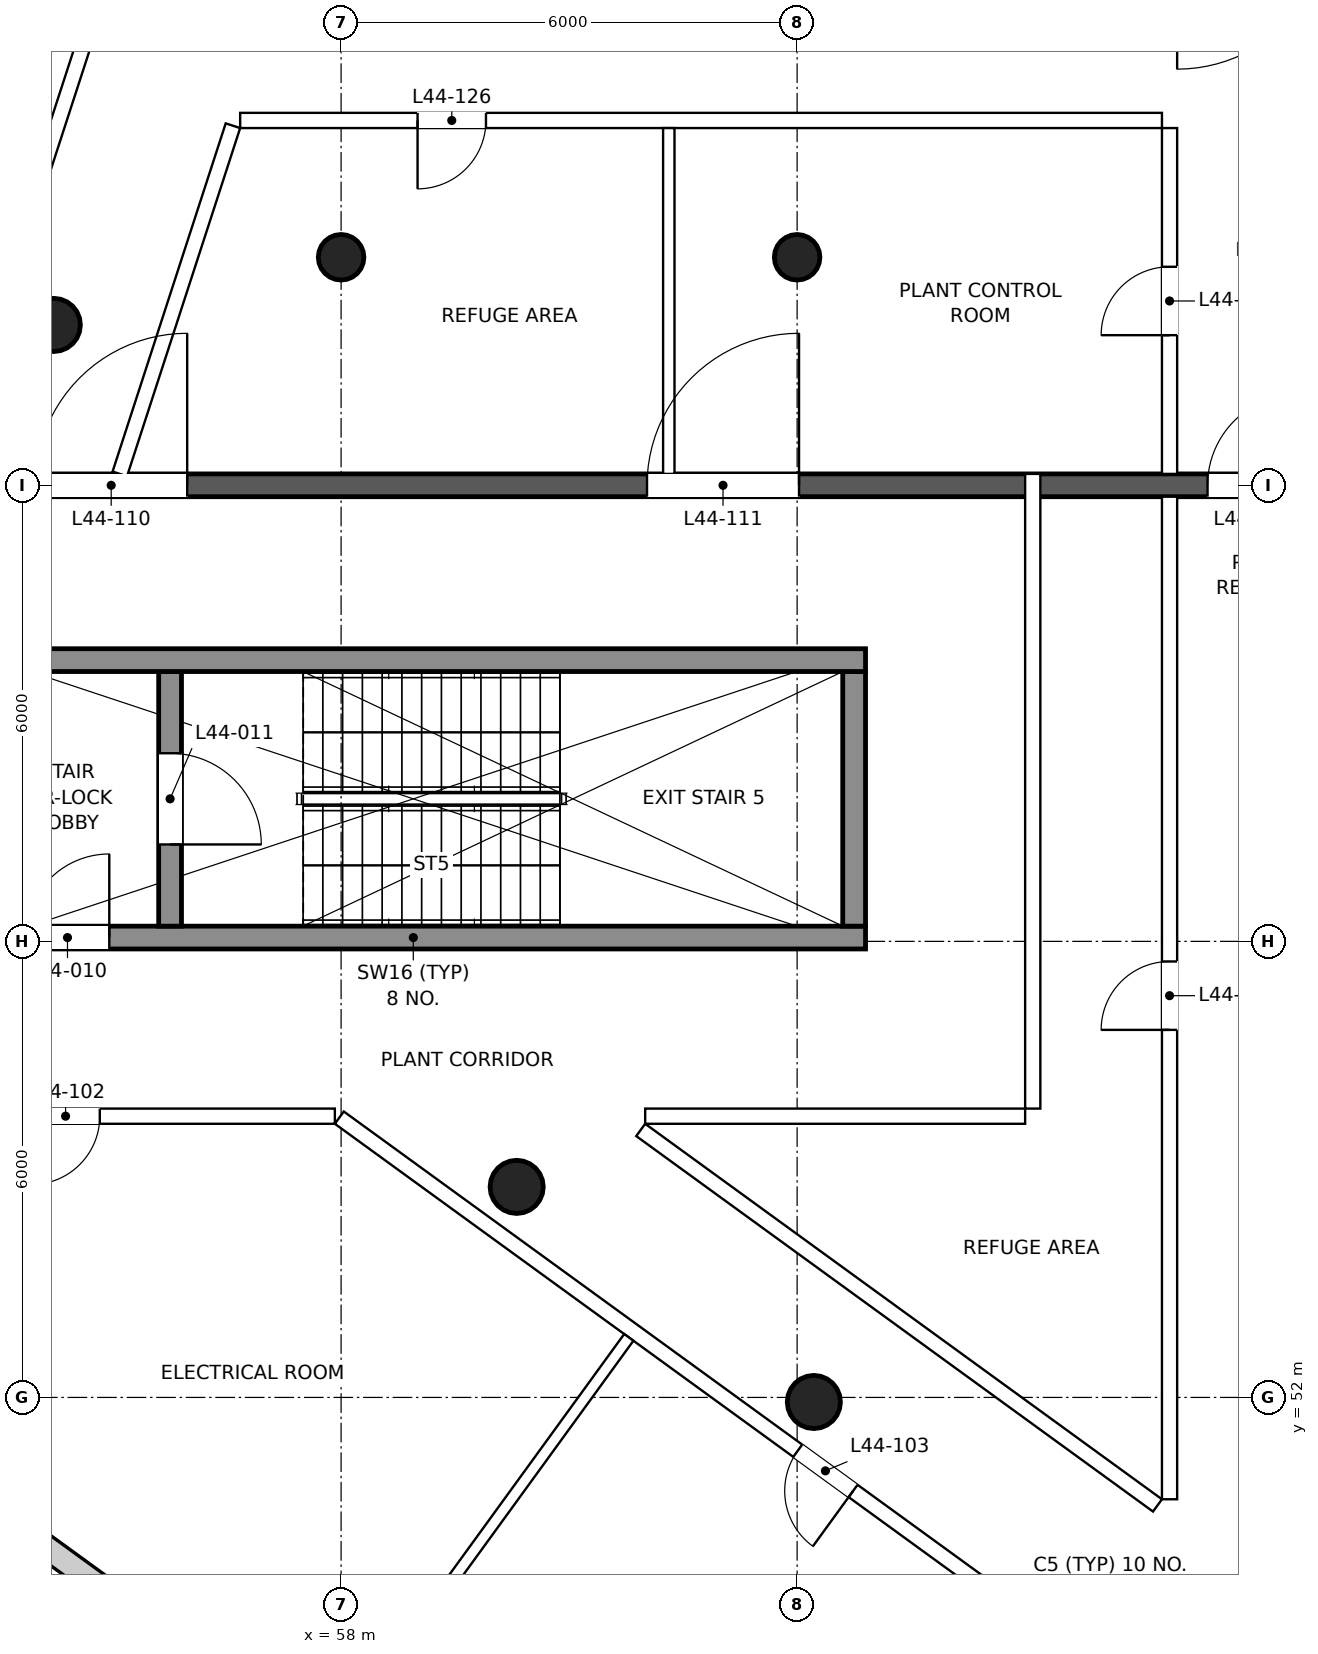
"""IFC4 building model, lengths in metres.
Left out: names, types, materials, properties, quantities, classifications, styles, units other than length and angle.
Written with IfcOpenShell. Run it as: python <this file> out.ifc"""

import sys

from ifc_helpers import new_model, si_unit, direction, frame, frame_2d, origin, origin_2d, place, context, subcontext, project, spatial, rectangle, circle, extrude, element, fill, save


model = new_model("IFC4")
c1 = context("Model", 3, precision=1e-05, world=origin(), true_north=direction((0.0, 1.0)))
c2 = subcontext(c1, "Body", "Model", "MODEL_VIEW")
j1 = project(units=[si_unit("LENGTHUNIT", "METRE"), si_unit("PLANEANGLEUNIT", "RADIAN")], contexts=[c1])
p1 = place(None, origin())
s1 = spatial("IfcSite", under=j1, at=p1, CompositionType="ELEMENT")
p2 = place(p1, origin())
s2 = spatial("IfcBuilding", under=s1, at=p2, CompositionType="ELEMENT")
p3 = place(p2, frame((0.0, 0.0, 191.5)))
s3 = spatial("IfcBuildingStorey", under=s2, at=p3, CompositionType="ELEMENT", Elevation=191.5)
for number, where, z_axis, x_axis in (
    (1, (60.31, 54.77, 0.0), (0.0, 0.0, 1.0), (1.0, 0.0, 0.0)),
    (2, (64.22, 51.94, 0.0), (0.0, 0.0, 1.0), (1.0, 0.0, 0.0)),
    (3, (54.22, 66.11, 0.0), (0.0, 0.0, 1.0), (1.0, 0.0, 0.0)),
):
    element("IfcColumn", number, at=place(p3, frame(where, z_axis=z_axis, x_axis=x_axis)), inside=s3, PredefinedType="COLUMN", context=c2, shape_type="SweptSolid", body=[
        extrude(circle(Radius=0.35, at=origin_2d()), origin(), (0.0, 0.0, 1.0), 5.0),
    ])
for number, where, z_axis, x_axis in (
    (4, (58.0, 67.0, 0.0), (0.0, 0.0, 1.0), (1.0, 0.0, 0.0)),
    (5, (64.0, 67.0, 0.0), (0.0, 0.0, 1.0), (1.0, 0.0, 0.0)),
):
    element("IfcColumn", number, at=place(p3, frame(where, z_axis=z_axis, x_axis=x_axis)), inside=s3, PredefinedType="COLUMN", context=c2, shape_type="SweptSolid", body=[
        extrude(circle(Radius=0.3, at=origin_2d()), origin(), (0.0, 0.0, 1.0), 5.0),
    ])
p4 = place(p3, frame((47.612, 54.757, 0.0), z_axis=(0.0, 0.0, 1.0), x_axis=(0.809015997552, -0.5877866243, 0.0)))
e6 = element("IfcWall", 6, at=p4, inside=s3, PredefinedType="SOLIDWALL", context=c2, shape_type="SweptSolid", body=[
    extrude(rectangle(XDim=22.246, YDim=0.32, at=frame_2d((11.123, 0.0))), origin(), (0.0, 0.0, 1.0), 4.7),
])
p5 = place(p3, frame((53.0, 58.05, 0.0), z_axis=(0.0, 0.0, 1.0), x_axis=(1.0, 0.0, 0.0)))
e7 = element("IfcWall", 7, at=p5, inside=s3, PredefinedType="SHEAR", context=c2, shape_type="SweptSolid", body=[
    extrude(rectangle(XDim=11.9, YDim=0.3, at=frame_2d((5.95, 0.0))), origin(), (0.0, 0.0, 1.0), 5.0),
])
p6 = place(p5, frame((0.85, 0.0, 0.0)))
e8 = element("IfcOpeningElement", 8, at=p6, cuts=e7, PredefinedType="OPENING", context=c2, shape_type="SweptSolid", body=[
    extrude(rectangle(XDim=1.1, YDim=2.1, at=frame_2d((0.55, 1.05))), frame((0.0, 0.16, 0.0), z_axis=(0.0, -1.0, 0.0), x_axis=(1.0, 0.0, 0.0)), (0.0, 0.0, 1.0), 0.32),
])
p7 = place(p3, frame((55.75, 58.2, 0.0), z_axis=(0.0, 0.0, 1.0), x_axis=(0.0, 1.0, 0.0)))
e9 = element("IfcWall", 9, at=p7, inside=s3, PredefinedType="SHEAR", context=c2, shape_type="SweptSolid", body=[
    extrude(rectangle(XDim=3.35, YDim=0.3, at=frame_2d((1.675, 0.0))), origin(), (0.0, 0.0, 1.0), 5.0),
])
p8 = place(p7, frame((1.075, 0.0, 0.0)))
e10 = element("IfcOpeningElement", 10, at=p8, cuts=e9, PredefinedType="OPENING", context=c2, shape_type="SweptSolid", body=[
    extrude(rectangle(XDim=1.2, YDim=2.1, at=frame_2d((0.6, 1.05))), frame((0.0, 0.16, 0.0), z_axis=(0.0, -1.0, 0.0), x_axis=(1.0, 0.0, 0.0)), (0.0, 0.0, 1.0), 0.32),
])
p9 = place(p3, frame((64.75, 58.2, 0.0), z_axis=(0.0, 0.0, 1.0), x_axis=(0.0, 1.0, 0.0)))
e11 = element("IfcWall", 11, at=p9, inside=s3, PredefinedType="SHEAR", context=c2, shape_type="SweptSolid", body=[
    extrude(rectangle(XDim=3.35, YDim=0.3, at=frame_2d((1.675, 0.0))), origin(), (0.0, 0.0, 1.0), 5.0),
])
p10 = place(p3, frame((53.0, 61.7, 0.0), z_axis=(0.0, 0.0, 1.0), x_axis=(1.0, 0.0, 0.0)))
e12 = element("IfcWall", 12, at=p10, inside=s3, PredefinedType="SHEAR", context=c2, shape_type="SweptSolid", body=[
    extrude(rectangle(XDim=11.9, YDim=0.3, at=frame_2d((5.95, 0.0))), origin(), (0.0, 0.0, 1.0), 5.0),
])
p11 = place(p3, frame((45.703, 64.0, 0.0), z_axis=(0.0, 0.0, 1.0), x_axis=(1.0, 0.0, 0.0)))
e13 = element("IfcWall", 13, at=p11, inside=s3, PredefinedType="PARTITIONING", context=c2, shape_type="SweptSolid", body=[
    extrude(rectangle(XDim=48.595, YDim=0.3, at=frame_2d((24.297, 0.0))), origin(), (0.0, 0.0, 1.0), 3.7),
])
p12 = place(p11, frame((8.272, 0.0, 0.0)))
e14 = element("IfcOpeningElement", 14, at=p12, cuts=e13, PredefinedType="OPENING", context=c2, shape_type="SweptSolid", body=[
    extrude(rectangle(XDim=2.0, YDim=2.1, at=frame_2d((1.0, 1.05))), frame((0.0, 0.16, 0.0), z_axis=(0.0, -1.0, 0.0), x_axis=(1.0, 0.0, 0.0)), (0.0, 0.0, 1.0), 0.32),
])
p13 = place(p11, frame((16.322, 0.0, 0.0)))
e15 = element("IfcOpeningElement", 15, at=p13, cuts=e13, PredefinedType="OPENING", context=c2, shape_type="SweptSolid", body=[
    extrude(rectangle(XDim=2.0, YDim=2.1, at=frame_2d((1.0, 1.05))), frame((0.0, 0.16, 0.0), z_axis=(0.0, -1.0, 0.0), x_axis=(1.0, 0.0, 0.0)), (0.0, 0.0, 1.0), 0.32),
])
p14 = place(p11, frame((23.697, 0.0, 0.0)))
e16 = element("IfcOpeningElement", 16, at=p14, cuts=e13, PredefinedType="OPENING", context=c2, shape_type="SweptSolid", body=[
    extrude(rectangle(XDim=1.2, YDim=2.1, at=frame_2d((0.6, 1.05))), frame((0.0, 0.16, 0.0), z_axis=(0.0, -1.0, 0.0), x_axis=(1.0, 0.0, 0.0)), (0.0, 0.0, 1.0), 0.32),
])
p15 = place(p11, frame((30.272, 0.0, 0.0)))
e17 = element("IfcOpeningElement", 17, at=p15, cuts=e13, PredefinedType="OPENING", context=c2, shape_type="SweptSolid", body=[
    extrude(rectangle(XDim=2.0, YDim=2.1, at=frame_2d((1.0, 1.05))), frame((0.0, 0.16, 0.0), z_axis=(0.0, -1.0, 0.0), x_axis=(1.0, 0.0, 0.0)), (0.0, 0.0, 1.0), 0.32),
])
p16 = place(p11, frame((38.322, 0.0, 0.0)))
e18 = element("IfcOpeningElement", 18, at=p16, cuts=e13, PredefinedType="OPENING", context=c2, shape_type="SweptSolid", body=[
    extrude(rectangle(XDim=2.0, YDim=2.1, at=frame_2d((1.0, 1.05))), frame((0.0, 0.16, 0.0), z_axis=(0.0, -1.0, 0.0), x_axis=(1.0, 0.0, 0.0)), (0.0, 0.0, 1.0), 0.32),
])
p17 = place(p3, frame((52.678, 63.85, 0.0), z_axis=(0.0, 0.0, 1.0), x_axis=(0.309023094896, 0.951054534094, 0.0)))
e19 = element("IfcWall", 19, at=p17, inside=s3, PredefinedType="PARTITIONING", context=c2, shape_type="SweptSolid", body=[
    extrude(rectangle(XDim=13.324, YDim=0.2, at=frame_2d((6.662, 0.0))), origin(), (0.0, 0.0, 1.0), 3.7),
])
p18 = place(p17, frame((1.516, 0.0, 0.0)))
e20 = element("IfcOpeningElement", 20, at=p18, cuts=e19, PredefinedType="OPENING", context=c2, shape_type="SweptSolid", body=[
    extrude(rectangle(XDim=0.9, YDim=2.1, at=frame_2d((0.45, 1.05))), frame((0.0, 0.11, 0.0), z_axis=(0.0, -1.0, 0.0), x_axis=(1.0, 0.0, 0.0)), (0.0, 0.0, 1.0), 0.22),
])
p19 = place(p17, frame((6.602, 0.0, 0.0)))
e21 = element("IfcOpeningElement", 21, at=p19, cuts=e19, PredefinedType="OPENING", context=c2, shape_type="SweptSolid", body=[
    extrude(rectangle(XDim=0.9, YDim=2.1, at=frame_2d((0.45, 1.05))), frame((0.0, 0.11, 0.0), z_axis=(0.0, -1.0, 0.0), x_axis=(1.0, 0.0, 0.0)), (0.0, 0.0, 1.0), 0.22),
])
p20 = place(p17, frame((11.351, 0.0, 0.0)))
e22 = element("IfcOpeningElement", 22, at=p20, cuts=e19, PredefinedType="OPENING", context=c2, shape_type="SweptSolid", body=[
    extrude(rectangle(XDim=0.9, YDim=2.1, at=frame_2d((0.45, 1.05))), frame((0.0, 0.11, 0.0), z_axis=(0.0, -1.0, 0.0), x_axis=(1.0, 0.0, 0.0)), (0.0, 0.0, 1.0), 0.22),
])
p21 = place(p3, frame((67.805, 48.54, 0.0), z_axis=(0.0, 0.0, 1.0), x_axis=(-0.809021032416, 0.587779694366, 0.0)))
e23 = element("IfcWall", 23, at=p21, inside=s3, PredefinedType="PARTITIONING", context=c2, shape_type="SweptSolid", body=[
    extrude(rectangle(XDim=12.148, YDim=0.2, at=frame_2d((6.074, 0.0))), origin(), (0.0, 0.0, 1.0), 3.7),
])
p22 = place(p21, frame((3.793, 0.0, 0.0)))
e24 = element("IfcOpeningElement", 24, at=p22, cuts=e23, PredefinedType="OPENING", context=c2, shape_type="SweptSolid", body=[
    extrude(rectangle(XDim=0.9, YDim=2.1, at=frame_2d((0.45, 1.05))), frame((0.0, 0.11, 0.0), z_axis=(0.0, -1.0, 0.0), x_axis=(1.0, 0.0, 0.0)), (0.0, 0.0, 1.0), 0.22),
])
p23 = place(p21, frame((0.318, 0.0, 0.0)))
e25 = element("IfcOpeningElement", 25, at=p23, cuts=e23, PredefinedType="OPENING", context=c2, shape_type="SweptSolid", body=[
    extrude(rectangle(XDim=0.8, YDim=2.1, at=frame_2d((0.4, 1.05))), frame((0.0, 0.11, 0.0), z_axis=(0.0, -1.0, 0.0), x_axis=(1.0, 0.0, 0.0)), (0.0, 0.0, 1.0), 0.22),
])
p24 = place(p3, frame((57.918, 55.7, 0.0), z_axis=(0.0, 0.0, 1.0), x_axis=(-1.0, 0.0, 0.0)))
e26 = element("IfcWall", 26, at=p24, inside=s3, PredefinedType="PARTITIONING", context=c2, shape_type="SweptSolid", body=[
    extrude(rectangle(XDim=7.018, YDim=0.2, at=frame_2d((3.509, 0.0))), origin(), (0.0, 0.0, 1.0), 4.25),
])
p25 = place(p24, frame((3.093, 0.0, 0.0)))
e27 = element("IfcOpeningElement", 27, at=p25, cuts=e26, PredefinedType="OPENING", context=c2, shape_type="SweptSolid", body=[
    extrude(rectangle(XDim=0.9, YDim=2.1, at=frame_2d((0.45, 1.05))), frame((0.0, 0.11, 0.0), z_axis=(0.0, -1.0, 0.0), x_axis=(1.0, 0.0, 0.0)), (0.0, 0.0, 1.0), 0.22),
])
p26 = place(p3, frame((68.9, 50.66, 0.0), z_axis=(0.0, 0.0, 1.0), x_axis=(0.0, 1.0, 0.0)))
e28 = element("IfcWall", 28, at=p26, inside=s3, PredefinedType="PARTITIONING", context=c2, shape_type="SweptSolid", body=[
    extrude(rectangle(XDim=13.19, YDim=0.2, at=frame_2d((6.595, 0.0))), origin(), (0.0, 0.0, 1.0), 3.7),
])
p27 = place(p26, frame((6.175, 0.0, 0.0)))
e29 = element("IfcOpeningElement", 29, at=p27, cuts=e28, PredefinedType="OPENING", context=c2, shape_type="SweptSolid", body=[
    extrude(rectangle(XDim=0.9, YDim=2.1, at=frame_2d((0.45, 1.05))), frame((0.0, 0.11, 0.0), z_axis=(0.0, -1.0, 0.0), x_axis=(1.0, 0.0, 0.0)), (0.0, 0.0, 1.0), 0.22),
])
p28 = place(p3, frame((68.9, 64.15, 0.0), z_axis=(0.0, 0.0, 1.0), x_axis=(0.0, 1.0, 0.0)))
e30 = element("IfcWall", 30, at=p28, inside=s3, PredefinedType="PARTITIONING", context=c2, shape_type="SweptSolid", body=[
    extrude(rectangle(XDim=4.55, YDim=0.2, at=frame_2d((2.275, 0.0))), origin(), (0.0, 0.0, 1.0), 4.7),
])
p29 = place(p28, frame((1.825, 0.0, 0.0)))
e31 = element("IfcOpeningElement", 31, at=p29, cuts=e30, PredefinedType="OPENING", context=c2, shape_type="SweptSolid", body=[
    extrude(rectangle(XDim=0.9, YDim=2.1, at=frame_2d((0.45, 1.05))), frame((0.0, 0.11, 0.0), z_axis=(0.0, -1.0, 0.0), x_axis=(1.0, 0.0, 0.0)), (0.0, 0.0, 1.0), 0.22),
])
p30 = place(p3, frame((68.8, 68.8, 0.0), z_axis=(0.0, 0.0, 1.0), x_axis=(-1.0, 0.0, 0.0)))
e32 = element("IfcWall", 32, at=p30, inside=s3, PredefinedType="PARTITIONING", context=c2, shape_type="SweptSolid", body=[
    extrude(rectangle(XDim=12.128, YDim=0.2, at=frame_2d((6.064, 0.0))), origin(), (0.0, 0.0, 1.0), 4.7),
])
p31 = place(p30, frame((8.894, 0.0, 0.0)))
e33 = element("IfcOpeningElement", 33, at=p31, cuts=e32, PredefinedType="OPENING", context=c2, shape_type="SweptSolid", body=[
    extrude(rectangle(XDim=0.9, YDim=2.1, at=frame_2d((0.45, 1.05))), frame((0.0, 0.11, 0.0), z_axis=(0.0, -1.0, 0.0), x_axis=(1.0, 0.0, 0.0)), (0.0, 0.0, 1.0), 0.22),
])
p32 = place(p3, frame((56.577, 68.731, 0.0), z_axis=(0.0, 0.0, 1.0), x_axis=(-0.309026476021, -0.951053435469, 0.0)))
e34 = element("IfcWall", 34, at=p32, inside=s3, PredefinedType="PARTITIONING", context=c2, shape_type="SweptSolid", body=[
    extrude(rectangle(XDim=4.817, YDim=0.2, at=frame_2d((2.408, 0.0))), origin(), (0.0, 0.0, 1.0), 3.7),
])
p33 = place(p3, frame((67.1, 64.15, 0.0), z_axis=(0.0, 0.0, 1.0), x_axis=(0.0, -1.0, 0.0)))
e35 = element("IfcWall", 35, at=p33, inside=s3, PredefinedType="PARTITIONING", context=c2, shape_type="SweptSolid", body=[
    extrude(rectangle(XDim=8.35, YDim=0.2, at=frame_2d((4.175, 0.0))), origin(), (0.0, 0.0, 1.0), 3.7),
])
p34 = place(p3, frame((67.0, 55.7, 0.0), z_axis=(0.0, 0.0, 1.0), x_axis=(-1.0, 0.0, 0.0)))
e36 = element("IfcWall", 36, at=p34, inside=s3, PredefinedType="PARTITIONING", context=c2, shape_type="SweptSolid", body=[
    extrude(rectangle(XDim=4.999, YDim=0.2, at=frame_2d((2.5, 0.0))), origin(), (0.0, 0.0, 1.0), 3.7),
])
p35 = place(p3, frame((61.942, 55.519, 0.0), z_axis=(0.0, 0.0, 1.0), x_axis=(0.809023664715, -0.587776071248, 0.0)))
e37 = element("IfcWall", 37, at=p35, inside=s3, PredefinedType="PARTITIONING", context=c2, shape_type="SweptSolid", body=[
    extrude(rectangle(XDim=8.404, YDim=0.2, at=frame_2d((4.202, 0.0))), origin(), (0.0, 0.0, 1.0), 3.7),
])
p36 = place(p3, frame((57.918, 47.467, 0.0), z_axis=(0.0, 0.0, 1.0), x_axis=(0.587796586364, 0.809008759569, 0.0)))
e38 = element("IfcWall", 38, at=p36, inside=s3, PredefinedType="PARTITIONING", context=c2, shape_type="SweptSolid", body=[
    extrude(rectangle(XDim=6.58, YDim=0.15, at=frame_2d((3.29, 0.0))), origin(), (0.0, 0.0, 1.0), 4.7),
])
p37 = place(p3, frame((62.312, 64.15, 0.0), z_axis=(0.0, 0.0, 1.0), x_axis=(0.0, 1.0, 0.0)))
e39 = element("IfcWall", 39, at=p37, inside=s3, PredefinedType="PARTITIONING", context=c2, shape_type="SweptSolid", body=[
    extrude(rectangle(XDim=4.55, YDim=0.15, at=frame_2d((2.275, 0.0))), origin(), (0.0, 0.0, 1.0), 4.7),
])
p38 = place(p6, origin())
e40 = element("IfcDoor", 40, at=p38, inside=s3, OperationType="SINGLE_SWING_RIGHT", PredefinedType="DOOR", context=c2, shape_type="SweptSolid", body=[
    extrude(rectangle(XDim=1.1, YDim=2.1, at=frame_2d((0.55, 1.05))), frame((0.0, 0.025, 0.0), z_axis=(0.0, -1.0, 0.0), x_axis=(1.0, 0.0, 0.0)), (0.0, 0.0, 1.0), 0.05),
])
fill(e8, e40)
p39 = place(p8, frame((1.2, 0.0, 0.0), z_axis=(0.0, 0.0, 1.0), x_axis=(-1.0, 0.0, 0.0)))
e41 = element("IfcDoor", 41, at=p39, inside=s3, OperationType="SINGLE_SWING_RIGHT", PredefinedType="DOOR", context=c2, shape_type="SweptSolid", body=[
    extrude(rectangle(XDim=1.2, YDim=2.1, at=frame_2d((0.6, 1.05))), frame((0.0, 0.025, 0.0), z_axis=(0.0, -1.0, 0.0), x_axis=(1.0, 0.0, 0.0)), (0.0, 0.0, 1.0), 0.05),
])
fill(e10, e41)
p40 = place(p25, origin())
e42 = element("IfcDoor", 42, at=p40, inside=s3, OperationType="SINGLE_SWING_RIGHT", PredefinedType="DOOR", context=c2, shape_type="SweptSolid", body=[
    extrude(rectangle(XDim=0.9, YDim=2.1, at=frame_2d((0.45, 1.05))), frame((0.0, 0.025, 0.0), z_axis=(0.0, -1.0, 0.0), x_axis=(1.0, 0.0, 0.0)), (0.0, 0.0, 1.0), 0.05),
])
fill(e27, e42)
p41 = place(p22, origin())
e43 = element("IfcDoor", 43, at=p41, inside=s3, OperationType="SINGLE_SWING_LEFT", PredefinedType="DOOR", context=c2, shape_type="SweptSolid", body=[
    extrude(rectangle(XDim=0.9, YDim=2.1, at=frame_2d((0.45, 1.05))), frame((0.0, 0.025, 0.0), z_axis=(0.0, -1.0, 0.0), x_axis=(1.0, 0.0, 0.0)), (0.0, 0.0, 1.0), 0.05),
])
fill(e24, e43)
p42 = place(p12, origin())
e44 = element("IfcDoor", 44, at=p42, inside=s3, OperationType="DOUBLE_DOOR_SINGLE_SWING", PredefinedType="DOOR", context=c2, shape_type="SweptSolid", body=[
    extrude(rectangle(XDim=2.0, YDim=2.1, at=frame_2d((1.0, 1.05))), frame((0.0, 0.025, 0.0), z_axis=(0.0, -1.0, 0.0), x_axis=(1.0, 0.0, 0.0)), (0.0, 0.0, 1.0), 0.05),
])
fill(e14, e44)
p43 = place(p13, origin())
e45 = element("IfcDoor", 45, at=p43, inside=s3, OperationType="DOUBLE_DOOR_SINGLE_SWING", PredefinedType="DOOR", context=c2, shape_type="SweptSolid", body=[
    extrude(rectangle(XDim=2.0, YDim=2.1, at=frame_2d((1.0, 1.05))), frame((0.0, 0.025, 0.0), z_axis=(0.0, -1.0, 0.0), x_axis=(1.0, 0.0, 0.0)), (0.0, 0.0, 1.0), 0.05),
])
fill(e15, e45)
p44 = place(p14, origin())
e46 = element("IfcDoor", 46, at=p44, inside=s3, OperationType="SINGLE_SWING_RIGHT", PredefinedType="DOOR", context=c2, shape_type="SweptSolid", body=[
    extrude(rectangle(XDim=1.2, YDim=2.1, at=frame_2d((0.6, 1.05))), frame((0.0, 0.025, 0.0), z_axis=(0.0, -1.0, 0.0), x_axis=(1.0, 0.0, 0.0)), (0.0, 0.0, 1.0), 0.05),
])
fill(e16, e46)
p45 = place(p27, origin())
e47 = element("IfcDoor", 47, at=p45, inside=s3, OperationType="SINGLE_SWING_LEFT", PredefinedType="DOOR", context=c2, shape_type="SweptSolid", body=[
    extrude(rectangle(XDim=0.9, YDim=2.1, at=frame_2d((0.45, 1.05))), frame((0.0, 0.025, 0.0), z_axis=(0.0, -1.0, 0.0), x_axis=(1.0, 0.0, 0.0)), (0.0, 0.0, 1.0), 0.05),
])
fill(e29, e47)
p46 = place(p29, origin())
e48 = element("IfcDoor", 48, at=p46, inside=s3, OperationType="SINGLE_SWING_LEFT", PredefinedType="DOOR", context=c2, shape_type="SweptSolid", body=[
    extrude(rectangle(XDim=0.9, YDim=2.1, at=frame_2d((0.45, 1.05))), frame((0.0, 0.025, 0.0), z_axis=(0.0, -1.0, 0.0), x_axis=(1.0, 0.0, 0.0)), (0.0, 0.0, 1.0), 0.05),
])
fill(e31, e48)
p47 = place(p31, origin())
e49 = element("IfcDoor", 49, at=p47, inside=s3, OperationType="SINGLE_SWING_RIGHT", PredefinedType="DOOR", context=c2, shape_type="SweptSolid", body=[
    extrude(rectangle(XDim=0.9, YDim=2.1, at=frame_2d((0.45, 1.05))), frame((0.0, 0.025, 0.0), z_axis=(0.0, -1.0, 0.0), x_axis=(1.0, 0.0, 0.0)), (0.0, 0.0, 1.0), 0.05),
])
fill(e33, e49)
save(model, sys.argv[1])
